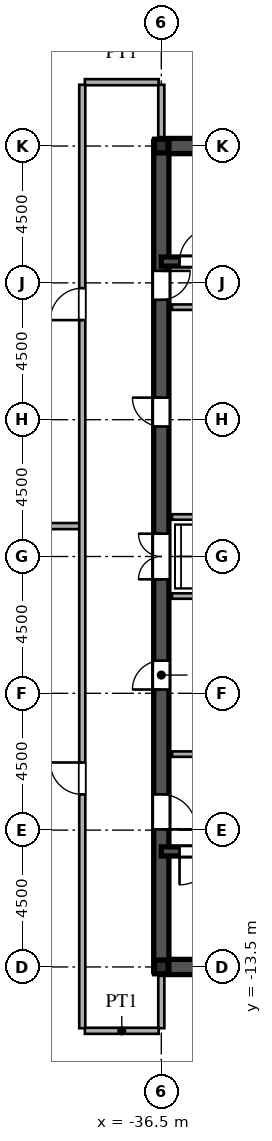
"""IFC4 building model, lengths in metres.
Left out: names, types, materials, properties, quantities, classifications, styles, units other than length and angle.
Written with IfcOpenShell. Run it as: python <this file> out.ifc"""

import sys

from ifc_helpers import new_model, si_unit, direction, frame, frame_2d, origin, origin_2d, place, context, subcontext, project, spatial, rectangle, i_section, extrude, source, transform, mapped, element, fill, save


model = new_model("IFC4")
c1 = context("Model", 3, precision=1e-05, world=origin(), true_north=direction((0.0, 1.0)))
c2 = subcontext(c1, "Body", "Model", "MODEL_VIEW")
j1 = project(units=[si_unit("LENGTHUNIT", "METRE"), si_unit("PLANEANGLEUNIT", "RADIAN")], contexts=[c1])
p1 = place(None, origin())
s1 = spatial("IfcSite", under=j1, at=p1, CompositionType="ELEMENT")
p2 = place(p1, origin())
s2 = spatial("IfcBuilding", under=s1, at=p2, CompositionType="ELEMENT")
p3 = place(p2, frame((0.0, 0.0, 261.9)))
s3 = spatial("IfcBuildingStorey", under=s2, at=p3, CompositionType="ELEMENT", Elevation=261.9)
m1 = source(origin(), c2, "Body", "SweptSolid", [
    extrude(i_section(OverallWidth=0.45, OverallDepth=0.45, WebThickness=0.016, FlangeThickness=0.025, at=origin_2d()), origin(), (0.0, 0.0, 1.0), 3.75),
])
for number, where, z_axis, x_axis in (
    (1, (-36.5, -13.5, 0.0), (0.0, 0.0, 1.0), (1.0, 0.0, 0.0)),
    (2, (-36.5, 13.5, 0.0), (0.0, 0.0, 1.0), (1.0, 0.0, 0.0)),
):
    element("IfcColumn", number, at=place(p3, frame(where, z_axis=z_axis, x_axis=x_axis)), inside=s3, PredefinedType="COLUMN", context=c2, shape_type="MappedRepresentation", body=[
        mapped(m1, transform((0.0, 0.0, 0.0), scale=1.0)),
    ])
for number, where, z_axis, x_axis in (
    (3, (-36.5, -13.5, 0.0), (0.0, 0.0, 1.0), (1.0, 0.0, 0.0)),
    (4, (-36.5, 13.5, 0.0), (0.0, 0.0, 1.0), (1.0, 0.0, 0.0)),
):
    element("IfcWall", number, at=place(p3, frame(where, z_axis=z_axis, x_axis=x_axis)), inside=s3, PredefinedType="SHEAR", context=c2, shape_type="SweptSolid", body=[
        extrude(rectangle(XDim=9.0, YDim=0.5, at=frame_2d((4.5, 0.0))), origin(), (0.0, 0.0, 1.0), 3.53),
    ])
p4 = place(p3, frame((-36.5, -13.65, 0.0), z_axis=(0.0, 0.0, 1.0), x_axis=(0.0, 1.0, 0.0)))
e5 = element("IfcWall", 5, at=p4, inside=s3, PredefinedType="SHEAR", context=c2, shape_type="SweptSolid", body=[
    extrude(rectangle(XDim=7.15, YDim=0.5, at=frame_2d((3.575, 0.0))), origin(), (0.0, 0.0, 1.0), 3.53),
])
p5 = place(p4, frame((4.675, 0.0, 0.0)))
e6 = element("IfcOpeningElement", 6, at=p5, cuts=e5, PredefinedType="OPENING", context=c2, shape_type="SweptSolid", body=[
    extrude(rectangle(XDim=1.15, YDim=2.2, at=frame_2d((0.575, 1.1))), frame((0.0, 0.26, 0.0), z_axis=(0.0, -1.0, 0.0), x_axis=(1.0, 0.0, 0.0)), (0.0, 0.0, 1.0), 0.52),
])
p6 = place(p3, frame((-36.5, -1.3, 0.0), z_axis=(0.0, 0.0, 1.0), x_axis=(0.0, 1.0, 0.0)))
e7 = element("IfcWall", 7, at=p6, inside=s3, PredefinedType="SHEAR", context=c2, shape_type="SweptSolid", body=[
    extrude(rectangle(XDim=2.6, YDim=0.5, at=frame_2d((1.3, 0.0))), origin(), (0.0, 0.0, 1.0), 3.53),
])
p7 = place(p6, frame((0.55, 0.0, 0.0)))
e8 = element("IfcOpeningElement", 8, at=p7, cuts=e7, PredefinedType="OPENING", context=c2, shape_type="SweptSolid", body=[
    extrude(rectangle(XDim=1.5, YDim=2.3, at=frame_2d((0.75, 1.15))), frame((0.0, 0.26, 0.0), z_axis=(0.0, -1.0, 0.0), x_axis=(1.0, 0.0, 0.0)), (0.0, 0.0, 1.0), 0.52),
])
p8 = place(p3, frame((-36.5, 8.2, 0.0), z_axis=(0.0, 0.0, 1.0), x_axis=(0.0, 1.0, 0.0)))
e9 = element("IfcWall", 9, at=p8, inside=s3, PredefinedType="SHEAR", context=c2, shape_type="SweptSolid", body=[
    extrude(rectangle(XDim=5.45, YDim=0.5, at=frame_2d((2.725, 0.0))), origin(), (0.0, 0.0, 1.0), 3.53),
])
p9 = place(p8, frame((0.245, 0.0, 0.0)))
e10 = element("IfcOpeningElement", 10, at=p9, cuts=e9, PredefinedType="OPENING", context=c2, shape_type="SweptSolid", body=[
    extrude(rectangle(XDim=0.95, YDim=2.15, at=frame_2d((0.475, 1.075))), frame((0.0, 0.26, 0.0), z_axis=(0.0, -1.0, 0.0), x_axis=(1.0, 0.0, 0.0)), (0.0, 0.0, 1.0), 0.52),
])
p10 = place(p3, frame((-36.5, -6.5, 0.0), z_axis=(0.0, 0.0, 1.0), x_axis=(0.0, 1.0, 0.0)))
e11 = element("IfcWall", 11, at=p10, inside=s3, PredefinedType="SHEAR", context=c2, shape_type="SweptSolid", body=[
    extrude(rectangle(XDim=5.2, YDim=0.5, at=frame_2d((2.6, 0.0))), origin(), (0.0, 0.0, 1.0), 3.53),
])
p11 = place(p10, frame((2.125, 0.0, 0.0)))
e12 = element("IfcOpeningElement", 12, at=p11, cuts=e11, PredefinedType="OPENING", context=c2, shape_type="SweptSolid", body=[
    extrude(rectangle(XDim=0.95, YDim=2.15, at=frame_2d((0.475, 1.075))), frame((0.0, 0.26, 0.0), z_axis=(0.0, -1.0, 0.0), x_axis=(1.0, 0.0, 0.0)), (0.0, 0.0, 1.0), 0.52),
])
p12 = place(p3, frame((-36.5, 1.3, 0.0), z_axis=(0.0, 0.0, 1.0), x_axis=(0.0, 1.0, 0.0)))
e13 = element("IfcWall", 13, at=p12, inside=s3, PredefinedType="SHEAR", context=c2, shape_type="SweptSolid", body=[
    extrude(rectangle(XDim=6.9, YDim=0.5, at=frame_2d((3.45, 0.0))), origin(), (0.0, 0.0, 1.0), 3.53),
])
p13 = place(p12, frame((2.975, 0.0, 0.0)))
e14 = element("IfcOpeningElement", 14, at=p13, cuts=e13, PredefinedType="OPENING", context=c2, shape_type="SweptSolid", body=[
    extrude(rectangle(XDim=0.95, YDim=2.15, at=frame_2d((0.475, 1.075))), frame((0.0, 0.26, 0.0), z_axis=(0.0, -1.0, 0.0), x_axis=(1.0, 0.0, 0.0)), (0.0, 0.0, 1.0), 0.52),
])
p14 = place(p3, frame((-36.5, -9.7, 0.0), z_axis=(0.0, 0.0, 1.0), x_axis=(1.0, 0.0, 0.0)))
e15 = element("IfcWall", 15, at=p14, inside=s3, PredefinedType="SHEAR", context=c2, shape_type="SweptSolid", body=[
    extrude(rectangle(XDim=9.0, YDim=0.3, at=frame_2d((4.5, 0.0))), origin(), (0.0, 0.0, 1.0), 3.53),
])
p15 = place(p14, frame((0.6, 0.0, 0.0)))
e16 = element("IfcOpeningElement", 16, at=p15, cuts=e15, PredefinedType="OPENING", context=c2, shape_type="SweptSolid", body=[
    extrude(rectangle(XDim=1.1, YDim=2.2, at=frame_2d((0.55, 1.1))), frame((0.0, 0.16, 0.0), z_axis=(0.0, -1.0, 0.0), x_axis=(1.0, 0.0, 0.0)), (0.0, 0.0, 1.0), 0.32),
])
p16 = place(p3, frame((-36.5, 9.7, 0.0), z_axis=(0.0, 0.0, 1.0), x_axis=(1.0, 0.0, 0.0)))
e17 = element("IfcWall", 17, at=p16, inside=s3, PredefinedType="SHEAR", context=c2, shape_type="SweptSolid", body=[
    extrude(rectangle(XDim=9.0, YDim=0.3, at=frame_2d((4.5, 0.0))), origin(), (0.0, 0.0, 1.0), 3.53),
])
p17 = place(p16, frame((0.6, 0.0, 0.0)))
e18 = element("IfcOpeningElement", 18, at=p17, cuts=e17, PredefinedType="OPENING", context=c2, shape_type="SweptSolid", body=[
    extrude(rectangle(XDim=1.1, YDim=2.2, at=frame_2d((0.55, 1.1))), frame((0.0, 0.16, 0.0), z_axis=(0.0, -1.0, 0.0), x_axis=(1.0, 0.0, 0.0)), (0.0, 0.0, 1.0), 0.32),
])
for number, where, z_axis, x_axis in (
    (19, (-36.15, -6.5, 0.0), (0.0, 0.0, 1.0), (1.0, 0.0, 0.0)),
    (20, (-36.15, 8.2, 0.0), (0.0, 0.0, 1.0), (1.0, 0.0, 0.0)),
):
    element("IfcWall", number, at=place(p3, frame(where, z_axis=z_axis, x_axis=x_axis)), inside=s3, PredefinedType="PARTITIONING", context=c2, shape_type="SweptSolid", body=[
        extrude(rectangle(XDim=5.7, YDim=0.18, at=frame_2d((2.85, 0.0))), origin(), (0.0, 0.0, 1.0), 3.53),
    ])
for number, where, z_axis, x_axis in (
    (21, (-36.15, -1.3, 0.0), (0.0, 0.0, 1.0), (1.0, 0.0, 0.0)),
    (22, (-36.15, 1.3, 0.0), (0.0, 0.0, 1.0), (1.0, 0.0, 0.0)),
):
    element("IfcWall", number, at=place(p3, frame(where, z_axis=z_axis, x_axis=x_axis)), inside=s3, PredefinedType="PARTITIONING", context=c2, shape_type="SweptSolid", body=[
        extrude(rectangle(XDim=2.95, YDim=0.18, at=frame_2d((1.475, 0.0))), origin(), (0.0, 0.0, 1.0), 3.53),
    ])
p18 = place(p3, frame((-39.015, -15.6, 0.0), z_axis=(0.0, 0.0, 1.0), x_axis=(1.0, 0.0, 0.0)))
e23 = element("IfcWall", 23, at=p18, inside=s3, PredefinedType="PARTITIONING", context=c2, shape_type="SweptSolid", body=[
    extrude(rectangle(XDim=2.43, YDim=0.2, at=frame_2d((1.215, 0.0))), origin(), (0.0, 0.0, 1.0), 3.53),
])
p19 = place(p3, frame((-67.375, 1.0, 0.0), z_axis=(0.0, 0.0, 1.0), x_axis=(1.0, 0.0, 0.0)))
e24 = element("IfcWall", 24, at=p19, inside=s3, PredefinedType="PARTITIONING", context=c2, shape_type="SweptSolid", body=[
    extrude(rectangle(XDim=28.195, YDim=0.2, at=frame_2d((14.098, 0.0))), origin(), (0.0, 0.0, 1.0), 3.53),
])
p20 = place(p3, frame((-39.015, 15.6, 0.0), z_axis=(0.0, 0.0, 1.0), x_axis=(1.0, 0.0, 0.0)))
e25 = element("IfcWall", 25, at=p20, inside=s3, PredefinedType="PARTITIONING", context=c2, shape_type="SweptSolid", body=[
    extrude(rectangle(XDim=2.43, YDim=0.2, at=frame_2d((1.215, 0.0))), origin(), (0.0, 0.0, 1.0), 3.53),
])
p21 = place(p3, frame((-39.1, -15.515, 0.0), z_axis=(0.0, 0.0, 1.0), x_axis=(0.0, 1.0, 0.0)))
e26 = element("IfcWall", 26, at=p21, inside=s3, PredefinedType="PARTITIONING", context=c2, shape_type="SweptSolid", body=[
    extrude(rectangle(XDim=31.03, YDim=0.2, at=frame_2d((15.515, 0.0))), origin(), (0.0, 0.0, 1.0), 3.53),
])
p22 = place(p21, frame((7.69, 0.0, 0.0)))
e27 = element("IfcOpeningElement", 27, at=p22, cuts=e26, PredefinedType="OPENING", context=c2, shape_type="SweptSolid", body=[
    extrude(rectangle(XDim=1.05, YDim=2.25, at=frame_2d((0.525, 1.125))), frame((0.0, 0.11, 0.0), z_axis=(0.0, -1.0, 0.0), x_axis=(1.0, 0.0, 0.0)), (0.0, 0.0, 1.0), 0.22),
])
p23 = place(p21, frame((23.29, 0.0, 0.0)))
e28 = element("IfcOpeningElement", 28, at=p23, cuts=e26, PredefinedType="OPENING", context=c2, shape_type="SweptSolid", body=[
    extrude(rectangle(XDim=1.05, YDim=2.25, at=frame_2d((0.525, 1.125))), frame((0.0, 0.11, 0.0), z_axis=(0.0, -1.0, 0.0), x_axis=(1.0, 0.0, 0.0)), (0.0, 0.0, 1.0), 0.22),
])
for number, where, z_axis, x_axis in (
    (29, (-36.5, -15.515, 0.0), (0.0, 0.0, 1.0), (0.0, 1.0, 0.0)),
    (30, (-36.5, 13.755, 0.0), (0.0, 0.0, 1.0), (0.0, 1.0, 0.0)),
):
    element("IfcWall", number, at=place(p3, frame(where, z_axis=z_axis, x_axis=x_axis)), inside=s3, PredefinedType="PARTITIONING", context=c2, shape_type="SweptSolid", body=[
        extrude(rectangle(XDim=1.76, YDim=0.2, at=frame_2d((0.88, 0.0))), origin(), (0.0, 0.0, 1.0), 2.93),
    ])
m2 = source(origin(), c2, "Body", "SweptSolid", [
    extrude(rectangle(XDim=1.15, YDim=2.2, at=frame_2d((0.575, 1.1))), frame((0.0, 0.025, 0.0), z_axis=(0.0, -1.0, 0.0), x_axis=(1.0, 0.0, 0.0)), (0.0, 0.0, 1.0), 0.05),
])
p24 = place(p5, frame((1.15, 0.0, 0.0), z_axis=(0.0, 0.0, 1.0), x_axis=(-1.0, 0.0, 0.0)))
e31 = element("IfcDoor", 31, at=p24, inside=s3, OperationType="SINGLE_SWING_LEFT", PredefinedType="DOOR", context=c2, shape_type="MappedRepresentation", body=[
    mapped(m2, transform((0.0, 0.0, 0.0), scale=1.0)),
])
fill(e6, e31)
m3 = source(origin(), c2, "Body", "SweptSolid", [
    extrude(rectangle(XDim=1.5, YDim=2.3, at=frame_2d((0.75, 1.15))), frame((0.0, 0.025, 0.0), z_axis=(0.0, -1.0, 0.0), x_axis=(1.0, 0.0, 0.0)), (0.0, 0.0, 1.0), 0.05),
])
p25 = place(p7, origin())
e32 = element("IfcDoor", 32, at=p25, inside=s3, OperationType="DOUBLE_SWING_LEFT", PredefinedType="DOOR", context=c2, shape_type="MappedRepresentation", body=[
    mapped(m3, transform((0.0, 0.0, 0.0), scale=1.0)),
])
fill(e8, e32)
m4 = source(origin(), c2, "Body", "SweptSolid", [
    extrude(rectangle(XDim=0.95, YDim=2.15, at=frame_2d((0.475, 1.075))), frame((0.0, 0.025, 0.0), z_axis=(0.0, -1.0, 0.0), x_axis=(1.0, 0.0, 0.0)), (0.0, 0.0, 1.0), 0.05),
])
p26 = place(p9, frame((0.95, 0.0, 0.0), z_axis=(0.0, 0.0, 1.0), x_axis=(-1.0, 0.0, 0.0)))
e33 = element("IfcDoor", 33, at=p26, inside=s3, OperationType="SINGLE_SWING_RIGHT", PredefinedType="DOOR", context=c2, shape_type="MappedRepresentation", body=[
    mapped(m4, transform((0.0, 0.0, 0.0), scale=1.0)),
])
fill(e10, e33)
p27 = place(p11, origin())
e34 = element("IfcDoor", 34, at=p27, inside=s3, OperationType="SINGLE_SWING_LEFT", PredefinedType="DOOR", context=c2, shape_type="MappedRepresentation", body=[
    mapped(m4, transform((0.0, 0.0, 0.0), scale=1.0)),
])
fill(e12, e34)
p28 = place(p13, origin())
e35 = element("IfcDoor", 35, at=p28, inside=s3, OperationType="SINGLE_SWING_RIGHT", PredefinedType="DOOR", context=c2, shape_type="MappedRepresentation", body=[
    mapped(m4, transform((0.0, 0.0, 0.0), scale=1.0)),
])
fill(e14, e35)
m5 = source(origin(), c2, "Body", "SweptSolid", [
    extrude(rectangle(XDim=1.1, YDim=2.2, at=frame_2d((0.55, 1.1))), frame((0.0, 0.025, 0.0), z_axis=(0.0, -1.0, 0.0), x_axis=(1.0, 0.0, 0.0)), (0.0, 0.0, 1.0), 0.05),
])
p29 = place(p15, frame((1.1, 0.0, 0.0), z_axis=(0.0, 0.0, 1.0), x_axis=(-1.0, 0.0, 0.0)))
e36 = element("IfcDoor", 36, at=p29, inside=s3, OperationType="SINGLE_SWING_LEFT", PredefinedType="DOOR", context=c2, shape_type="MappedRepresentation", body=[
    mapped(m5, transform((0.0, 0.0, 0.0), scale=1.0)),
])
fill(e16, e36)
p30 = place(p17, origin())
e37 = element("IfcDoor", 37, at=p30, inside=s3, OperationType="SINGLE_SWING_RIGHT", PredefinedType="DOOR", context=c2, shape_type="MappedRepresentation", body=[
    mapped(m5, transform((0.0, 0.0, 0.0), scale=1.0)),
])
fill(e18, e37)
m6 = source(origin(), c2, "Body", "SweptSolid", [
    extrude(rectangle(XDim=1.05, YDim=2.25, at=frame_2d((0.525, 1.125))), frame((0.0, 0.025, 0.0), z_axis=(0.0, -1.0, 0.0), x_axis=(1.0, 0.0, 0.0)), (0.0, 0.0, 1.0), 0.05),
])
p31 = place(p22, origin())
e38 = element("IfcDoor", 38, at=p31, inside=s3, OperationType="SINGLE_SWING_RIGHT", PredefinedType="DOOR", context=c2, shape_type="MappedRepresentation", body=[
    mapped(m6, transform((0.0, 0.0, 0.0), scale=1.0)),
])
fill(e27, e38)
p32 = place(p23, origin())
e39 = element("IfcDoor", 39, at=p32, inside=s3, OperationType="SINGLE_SWING_LEFT", PredefinedType="DOOR", context=c2, shape_type="MappedRepresentation", body=[
    mapped(m6, transform((0.0, 0.0, 0.0), scale=1.0)),
])
fill(e28, e39)
save(model, sys.argv[1])
